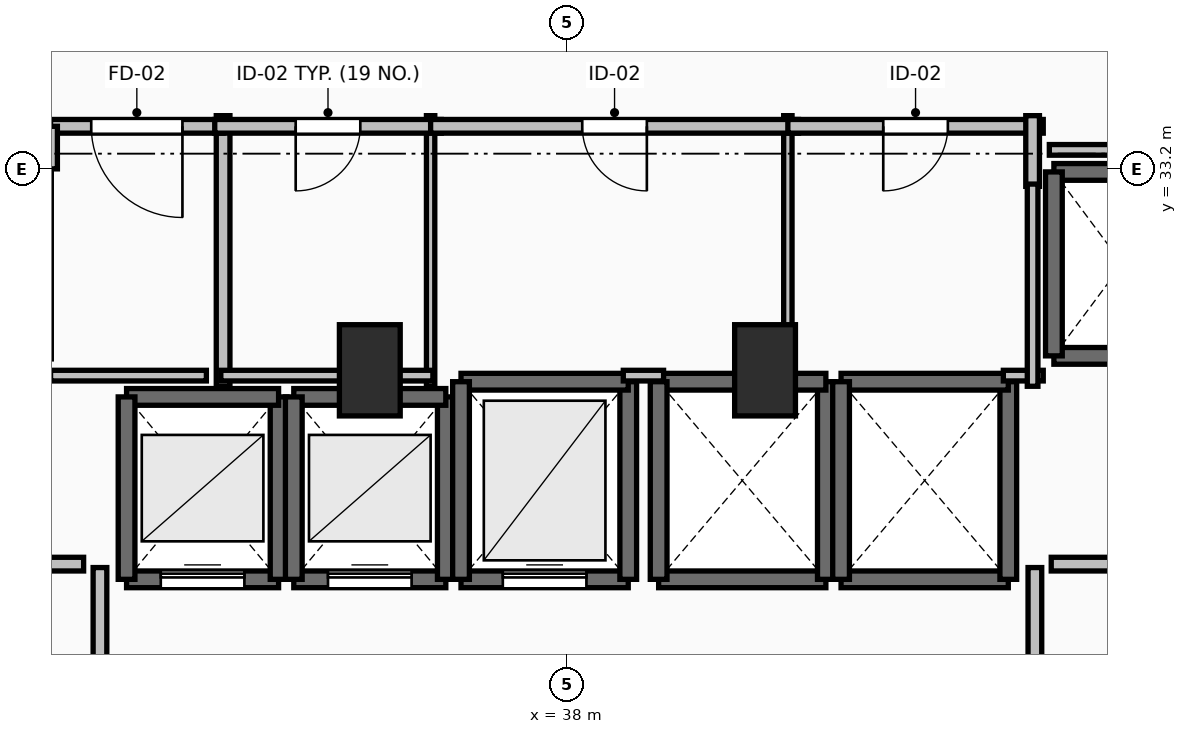
"""IFC4 building model, lengths in metres.
Left out: names, types, materials, properties, quantities, classifications, styles, units other than length and angle.
Written with IfcOpenShell. Run it as: python <this file> out.ifc"""

import sys

from ifc_helpers import new_model, si_unit, direction, frame, frame_2d, origin, origin_2d, place, context, subcontext, project, spatial, rectangle, extrude, element, fill, save


model = new_model("IFC4")
c1 = context("Model", 3, precision=1e-05, world=origin(), true_north=direction((0.0, 1.0)))
c2 = subcontext(c1, "Body", "Model", "MODEL_VIEW")
j1 = project(units=[si_unit("LENGTHUNIT", "METRE"), si_unit("PLANEANGLEUNIT", "RADIAN")], contexts=[c1])
p1 = place(None, origin())
s1 = spatial("IfcSite", under=j1, at=p1, CompositionType="ELEMENT")
p2 = place(p1, origin())
s2 = spatial("IfcBuilding", under=s1, at=p2, CompositionType="ELEMENT")
p3 = place(p2, frame((0.0, 0.0, 31.0)))
s3 = spatial("IfcBuildingStorey", under=s2, at=p3, CompositionType="ELEMENT", Elevation=31.0)
for number, where, z_axis, x_axis in (
    (1, (35.4, 30.55, 0.0), (0.0, 0.0, 1.0), (1.0, 0.0, 0.0)),
    (2, (40.6, 30.55, 0.0), (0.0, 0.0, 1.0), (1.0, 0.0, 0.0)),
):
    element("IfcColumn", number, at=place(p3, frame(where, z_axis=z_axis, x_axis=x_axis)), inside=s3, PredefinedType="PILASTER", context=c2, shape_type="SweptSolid", body=[
        extrude(rectangle(XDim=0.8, YDim=1.2, at=origin_2d()), origin(), (0.0, 0.0, 1.0), 3.5),
    ])
p4 = place(p3, frame((32.2, 27.8, 0.0), z_axis=(0.0, 0.0, 1.0), x_axis=(1.0, 0.0, 0.0)))
e3 = element("IfcWall", 3, at=p4, inside=s3, PredefinedType="SOLIDWALL", context=c2, shape_type="SweptSolid", body=[
    extrude(rectangle(XDim=2.0, YDim=0.22, at=frame_2d((1.0, 0.0))), origin(), (0.0, 0.0, 1.0), 3.24),
])
p5 = place(p4, frame((0.45, 0.0, 0.0)))
e4 = element("IfcOpeningElement", 4, at=p5, cuts=e3, PredefinedType="OPENING", context=c2, shape_type="SweptSolid", body=[
    extrude(rectangle(XDim=1.1, YDim=2.2, at=frame_2d((0.55, 1.1))), frame((0.0, 0.125, 0.0), z_axis=(0.0, -1.0, 0.0), x_axis=(1.0, 0.0, 0.0)), (0.0, 0.0, 1.0), 0.25),
])
p6 = place(p3, frame((34.2, 27.8, 0.0), z_axis=(0.0, 0.0, 1.0), x_axis=(0.0, 1.0, 0.0)))
e5 = element("IfcWall", 5, at=p6, inside=s3, PredefinedType="SOLIDWALL", context=c2, shape_type="SweptSolid", body=[
    extrude(rectangle(XDim=2.4, YDim=0.22, at=frame_2d((1.2, 0.0))), origin(), (0.0, 0.0, 1.0), 3.24),
])
p7 = place(p3, frame((34.2, 30.2, 0.0), z_axis=(0.0, 0.0, 1.0), x_axis=(-1.0, 0.0, 0.0)))
e6 = element("IfcWall", 6, at=p7, inside=s3, PredefinedType="SOLIDWALL", context=c2, shape_type="SweptSolid", body=[
    extrude(rectangle(XDim=2.0, YDim=0.22, at=frame_2d((1.0, 0.0))), origin(), (0.0, 0.0, 1.0), 3.24),
])
p8 = place(p3, frame((32.2, 30.2, 0.0), z_axis=(0.0, 0.0, 1.0), x_axis=(0.0, -1.0, 0.0)))
e7 = element("IfcWall", 7, at=p8, inside=s3, PredefinedType="SOLIDWALL", context=c2, shape_type="SweptSolid", body=[
    extrude(rectangle(XDim=2.4, YDim=0.22, at=frame_2d((1.2, 0.0))), origin(), (0.0, 0.0, 1.0), 3.24),
])
p9 = place(p3, frame((34.4, 27.8, 0.0), z_axis=(0.0, 0.0, 1.0), x_axis=(1.0, 0.0, 0.0)))
e8 = element("IfcWall", 8, at=p9, inside=s3, PredefinedType="SOLIDWALL", context=c2, shape_type="SweptSolid", body=[
    extrude(rectangle(XDim=2.0, YDim=0.22, at=frame_2d((1.0, 0.0))), origin(), (0.0, 0.0, 1.0), 3.24),
])
p10 = place(p9, frame((0.45, 0.0, 0.0)))
e9 = element("IfcOpeningElement", 9, at=p10, cuts=e8, PredefinedType="OPENING", context=c2, shape_type="SweptSolid", body=[
    extrude(rectangle(XDim=1.1, YDim=2.2, at=frame_2d((0.55, 1.1))), frame((0.0, 0.125, 0.0), z_axis=(0.0, -1.0, 0.0), x_axis=(1.0, 0.0, 0.0)), (0.0, 0.0, 1.0), 0.25),
])
p11 = place(p3, frame((36.4, 27.8, 0.0), z_axis=(0.0, 0.0, 1.0), x_axis=(0.0, 1.0, 0.0)))
e10 = element("IfcWall", 10, at=p11, inside=s3, PredefinedType="SOLIDWALL", context=c2, shape_type="SweptSolid", body=[
    extrude(rectangle(XDim=2.4, YDim=0.22, at=frame_2d((1.2, 0.0))), origin(), (0.0, 0.0, 1.0), 3.24),
])
p12 = place(p3, frame((36.4, 30.2, 0.0), z_axis=(0.0, 0.0, 1.0), x_axis=(-1.0, 0.0, 0.0)))
e11 = element("IfcWall", 11, at=p12, inside=s3, PredefinedType="SOLIDWALL", context=c2, shape_type="SweptSolid", body=[
    extrude(rectangle(XDim=2.0, YDim=0.22, at=frame_2d((1.0, 0.0))), origin(), (0.0, 0.0, 1.0), 3.24),
])
p13 = place(p3, frame((34.4, 30.2, 0.0), z_axis=(0.0, 0.0, 1.0), x_axis=(0.0, -1.0, 0.0)))
e12 = element("IfcWall", 12, at=p13, inside=s3, PredefinedType="SOLIDWALL", context=c2, shape_type="SweptSolid", body=[
    extrude(rectangle(XDim=2.4, YDim=0.22, at=frame_2d((1.2, 0.0))), origin(), (0.0, 0.0, 1.0), 3.24),
])
p14 = place(p3, frame((36.6, 27.8, 0.0), z_axis=(0.0, 0.0, 1.0), x_axis=(1.0, 0.0, 0.0)))
e13 = element("IfcWall", 13, at=p14, inside=s3, PredefinedType="SOLIDWALL", context=c2, shape_type="SweptSolid", body=[
    extrude(rectangle(XDim=2.2, YDim=0.22, at=frame_2d((1.1, 0.0))), origin(), (0.0, 0.0, 1.0), 3.24),
])
p15 = place(p14, frame((0.55, 0.0, 0.0)))
e14 = element("IfcOpeningElement", 14, at=p15, cuts=e13, PredefinedType="OPENING", context=c2, shape_type="SweptSolid", body=[
    extrude(rectangle(XDim=1.1, YDim=2.2, at=frame_2d((0.55, 1.1))), frame((0.0, 0.125, 0.0), z_axis=(0.0, -1.0, 0.0), x_axis=(1.0, 0.0, 0.0)), (0.0, 0.0, 1.0), 0.25),
])
p16 = place(p3, frame((38.8, 27.8, 0.0), z_axis=(0.0, 0.0, 1.0), x_axis=(0.0, 1.0, 0.0)))
e15 = element("IfcWall", 15, at=p16, inside=s3, PredefinedType="SOLIDWALL", context=c2, shape_type="SweptSolid", body=[
    extrude(rectangle(XDim=2.6, YDim=0.22, at=frame_2d((1.3, 0.0))), origin(), (0.0, 0.0, 1.0), 3.24),
])
p17 = place(p3, frame((38.8, 30.4, 0.0), z_axis=(0.0, 0.0, 1.0), x_axis=(-1.0, 0.0, 0.0)))
e16 = element("IfcWall", 16, at=p17, inside=s3, PredefinedType="SOLIDWALL", context=c2, shape_type="SweptSolid", body=[
    extrude(rectangle(XDim=2.2, YDim=0.22, at=frame_2d((1.1, 0.0))), origin(), (0.0, 0.0, 1.0), 3.24),
])
p18 = place(p3, frame((36.6, 30.4, 0.0), z_axis=(0.0, 0.0, 1.0), x_axis=(0.0, -1.0, 0.0)))
e17 = element("IfcWall", 17, at=p18, inside=s3, PredefinedType="SOLIDWALL", context=c2, shape_type="SweptSolid", body=[
    extrude(rectangle(XDim=2.6, YDim=0.22, at=frame_2d((1.3, 0.0))), origin(), (0.0, 0.0, 1.0), 3.24),
])
p19 = place(p3, frame((39.2, 27.8, 0.0), z_axis=(0.0, 0.0, 1.0), x_axis=(1.0, 0.0, 0.0)))
e18 = element("IfcWall", 18, at=p19, inside=s3, PredefinedType="SOLIDWALL", context=c2, shape_type="SweptSolid", body=[
    extrude(rectangle(XDim=2.2, YDim=0.22, at=frame_2d((1.1, 0.0))), origin(), (0.0, 0.0, 1.0), 3.24),
])
p20 = place(p3, frame((41.4, 27.8, 0.0), z_axis=(0.0, 0.0, 1.0), x_axis=(0.0, 1.0, 0.0)))
e19 = element("IfcWall", 19, at=p20, inside=s3, PredefinedType="SOLIDWALL", context=c2, shape_type="SweptSolid", body=[
    extrude(rectangle(XDim=2.6, YDim=0.22, at=frame_2d((1.3, 0.0))), origin(), (0.0, 0.0, 1.0), 3.24),
])
p21 = place(p3, frame((41.4, 30.4, 0.0), z_axis=(0.0, 0.0, 1.0), x_axis=(-1.0, 0.0, 0.0)))
e20 = element("IfcWall", 20, at=p21, inside=s3, PredefinedType="SOLIDWALL", context=c2, shape_type="SweptSolid", body=[
    extrude(rectangle(XDim=2.2, YDim=0.22, at=frame_2d((1.1, 0.0))), origin(), (0.0, 0.0, 1.0), 3.24),
])
p22 = place(p3, frame((39.2, 30.4, 0.0), z_axis=(0.0, 0.0, 1.0), x_axis=(0.0, -1.0, 0.0)))
e21 = element("IfcWall", 21, at=p22, inside=s3, PredefinedType="SOLIDWALL", context=c2, shape_type="SweptSolid", body=[
    extrude(rectangle(XDim=2.6, YDim=0.22, at=frame_2d((1.3, 0.0))), origin(), (0.0, 0.0, 1.0), 3.24),
])
p23 = place(p3, frame((41.6, 27.8, 0.0), z_axis=(0.0, 0.0, 1.0), x_axis=(1.0, 0.0, 0.0)))
e22 = element("IfcWall", 22, at=p23, inside=s3, PredefinedType="SOLIDWALL", context=c2, shape_type="SweptSolid", body=[
    extrude(rectangle(XDim=2.2, YDim=0.22, at=frame_2d((1.1, 0.0))), origin(), (0.0, 0.0, 1.0), 3.24),
])
p24 = place(p3, frame((43.8, 27.8, 0.0), z_axis=(0.0, 0.0, 1.0), x_axis=(0.0, 1.0, 0.0)))
e23 = element("IfcWall", 23, at=p24, inside=s3, PredefinedType="SOLIDWALL", context=c2, shape_type="SweptSolid", body=[
    extrude(rectangle(XDim=2.6, YDim=0.22, at=frame_2d((1.3, 0.0))), origin(), (0.0, 0.0, 1.0), 3.24),
])
p25 = place(p3, frame((43.8, 30.4, 0.0), z_axis=(0.0, 0.0, 1.0), x_axis=(-1.0, 0.0, 0.0)))
e24 = element("IfcWall", 24, at=p25, inside=s3, PredefinedType="SOLIDWALL", context=c2, shape_type="SweptSolid", body=[
    extrude(rectangle(XDim=2.2, YDim=0.22, at=frame_2d((1.1, 0.0))), origin(), (0.0, 0.0, 1.0), 3.24),
])
p26 = place(p3, frame((41.6, 30.4, 0.0), z_axis=(0.0, 0.0, 1.0), x_axis=(0.0, -1.0, 0.0)))
e25 = element("IfcWall", 25, at=p26, inside=s3, PredefinedType="SOLIDWALL", context=c2, shape_type="SweptSolid", body=[
    extrude(rectangle(XDim=2.6, YDim=0.22, at=frame_2d((1.3, 0.0))), origin(), (0.0, 0.0, 1.0), 3.24),
])
for number, where, z_axis, x_axis in (
    (26, (44.4, 30.74, 0.0), (0.0, 0.0, 1.0), (1.0, 0.0, 0.0)),
    (27, (46.2, 33.16, 0.0), (0.0, 0.0, 1.0), (-1.0, 0.0, 0.0)),
):
    element("IfcWall", number, at=place(p3, frame(where, z_axis=z_axis, x_axis=x_axis)), inside=s3, PredefinedType="SOLIDWALL", context=c2, shape_type="SweptSolid", body=[
        extrude(rectangle(XDim=1.8, YDim=0.22, at=frame_2d((0.9, 0.0))), origin(), (0.0, 0.0, 1.0), 3.24),
    ])
p27 = place(p3, frame((44.4, 33.16, 0.0), z_axis=(0.0, 0.0, 1.0), x_axis=(0.0, -1.0, 0.0)))
e28 = element("IfcWall", 28, at=p27, inside=s3, PredefinedType="SOLIDWALL", context=c2, shape_type="SweptSolid", body=[
    extrude(rectangle(XDim=2.42, YDim=0.22, at=frame_2d((1.21, 0.0))), origin(), (0.0, 0.0, 1.0), 3.24),
])
p28 = place(p3, frame((31.85, 24.045, 0.0), z_axis=(0.0, 0.0, 1.0), x_axis=(0.0, 1.0, 0.0)))
e29 = element("IfcWall", 29, at=p28, inside=s3, PredefinedType="PARTITIONING", context=c2, shape_type="SweptSolid", body=[
    extrude(rectangle(XDim=3.91, YDim=0.18, at=frame_2d((1.955, 0.0))), origin(), (0.0, 0.0, 1.0), 3.24),
])
p29 = place(p28, frame((1.355, 0.0, 0.0)))
e30 = element("IfcOpeningElement", 30, at=p29, cuts=e29, PredefinedType="OPENING", context=c2, shape_type="SweptSolid", body=[
    extrude(rectangle(XDim=1.2, YDim=2.15, at=frame_2d((0.6, 1.075))), frame((0.0, 0.105, 0.0), z_axis=(0.0, -1.0, 0.0), x_axis=(1.0, 0.0, 0.0)), (0.0, 0.0, 1.0), 0.21),
])
p30 = place(p3, frame((44.15, 27.955, 0.0), z_axis=(0.0, 0.0, 1.0), x_axis=(0.0, -1.0, 0.0)))
e31 = element("IfcWall", 31, at=p30, inside=s3, PredefinedType="PARTITIONING", context=c2, shape_type="SweptSolid", body=[
    extrude(rectangle(XDim=3.91, YDim=0.18, at=frame_2d((1.955, 0.0))), origin(), (0.0, 0.0, 1.0), 3.24),
])
p31 = place(p30, frame((1.355, 0.0, 0.0)))
e32 = element("IfcOpeningElement", 32, at=p31, cuts=e31, PredefinedType="OPENING", context=c2, shape_type="SweptSolid", body=[
    extrude(rectangle(XDim=1.2, YDim=2.15, at=frame_2d((0.6, 1.075))), frame((0.0, 0.105, 0.0), z_axis=(0.0, -1.0, 0.0), x_axis=(1.0, 0.0, 0.0)), (0.0, 0.0, 1.0), 0.21),
])
p32 = place(p3, frame((33.47, 30.34, 0.0), z_axis=(0.0, 0.0, 1.0), x_axis=(0.0, 1.0, 0.0)))
e33 = element("IfcWall", 33, at=p32, inside=s3, PredefinedType="PARTITIONING", context=c2, shape_type="SweptSolid", body=[
    extrude(rectangle(XDim=3.56, YDim=0.18, at=frame_2d((1.78, 0.0))), origin(), (0.0, 0.0, 1.0), 3.24),
])
p33 = place(p3, frame((33.47, 33.76, 0.0), z_axis=(0.0, 0.0, 1.0), x_axis=(-1.0, 0.0, 0.0)))
e34 = element("IfcWall", 34, at=p33, inside=s3, PredefinedType="PARTITIONING", context=c2, shape_type="SweptSolid", body=[
    extrude(rectangle(XDim=2.27, YDim=0.18, at=frame_2d((1.135, 0.0))), origin(), (0.0, 0.0, 1.0), 3.24),
])
p34 = place(p33, frame((0.535, 0.0, 0.0)))
e35 = element("IfcOpeningElement", 35, at=p34, cuts=e34, PredefinedType="OPENING", context=c2, shape_type="SweptSolid", body=[
    extrude(rectangle(XDim=1.2, YDim=2.15, at=frame_2d((0.6, 1.075))), frame((0.0, 0.105, 0.0), z_axis=(0.0, -1.0, 0.0), x_axis=(1.0, 0.0, 0.0)), (0.0, 0.0, 1.0), 0.21),
])
p35 = place(p3, frame((31.2, 33.76, 0.0), z_axis=(0.0, 0.0, 1.0), x_axis=(0.0, -1.0, 0.0)))
e36 = element("IfcWall", 36, at=p35, inside=s3, PredefinedType="PARTITIONING", context=c2, shape_type="SweptSolid", body=[
    extrude(rectangle(XDim=0.56, YDim=0.18, at=frame_2d((0.28, 0.0))), origin(), (0.0, 0.0, 1.0), 3.24),
])
p36 = place(p3, frame((36.2, 30.34, 0.0), z_axis=(0.0, 0.0, 1.0), x_axis=(0.0, 1.0, 0.0)))
e37 = element("IfcWall", 37, at=p36, inside=s3, PredefinedType="PARTITIONING", context=c2, shape_type="SweptSolid", body=[
    extrude(rectangle(XDim=3.56, YDim=0.11, at=frame_2d((1.78, 0.0))), origin(), (0.0, 0.0, 1.0), 2.432),
])
p37 = place(p3, frame((36.34, 33.76, 0.0), z_axis=(0.0, 0.0, 1.0), x_axis=(-1.0, 0.0, 0.0)))
e38 = element("IfcWall", 38, at=p37, inside=s3, PredefinedType="PARTITIONING", context=c2, shape_type="SweptSolid", body=[
    extrude(rectangle(XDim=2.98, YDim=0.18, at=frame_2d((1.49, 0.0))), origin(), (0.0, 0.0, 1.0), 3.24),
])
p38 = place(p37, frame((1.065, 0.0, 0.0)))
e39 = element("IfcOpeningElement", 39, at=p38, cuts=e38, PredefinedType="OPENING", context=c2, shape_type="SweptSolid", body=[
    extrude(rectangle(XDim=0.85, YDim=2.1, at=frame_2d((0.425, 1.05))), frame((0.0, 0.105, 0.0), z_axis=(0.0, -1.0, 0.0), x_axis=(1.0, 0.0, 0.0)), (0.0, 0.0, 1.0), 0.21),
])
p39 = place(p3, frame((40.9, 30.34, 0.0), z_axis=(0.0, 0.0, 1.0), x_axis=(0.0, 1.0, 0.0)))
e40 = element("IfcWall", 40, at=p39, inside=s3, PredefinedType="PARTITIONING", context=c2, shape_type="SweptSolid", body=[
    extrude(rectangle(XDim=3.56, YDim=0.11, at=frame_2d((1.78, 0.0))), origin(), (0.0, 0.0, 1.0), 3.24),
])
p40 = place(p3, frame((41.04, 33.76, 0.0), z_axis=(0.0, 0.0, 1.0), x_axis=(-1.0, 0.0, 0.0)))
e41 = element("IfcWall", 41, at=p40, inside=s3, PredefinedType="PARTITIONING", context=c2, shape_type="SweptSolid", body=[
    extrude(rectangle(XDim=4.84, YDim=0.18, at=frame_2d((2.42, 0.0))), origin(), (0.0, 0.0, 1.0), 3.24),
])
p41 = place(p40, frame((1.995, 0.0, 0.0)))
e42 = element("IfcOpeningElement", 42, at=p41, cuts=e41, PredefinedType="OPENING", context=c2, shape_type="SweptSolid", body=[
    extrude(rectangle(XDim=0.85, YDim=2.1, at=frame_2d((0.425, 1.05))), frame((0.0, 0.105, 0.0), z_axis=(0.0, -1.0, 0.0), x_axis=(1.0, 0.0, 0.0)), (0.0, 0.0, 1.0), 0.21),
])
p42 = place(p3, frame((44.26, 33.76, 0.0), z_axis=(0.0, 0.0, 1.0), x_axis=(-1.0, 0.0, 0.0)))
e43 = element("IfcWall", 43, at=p42, inside=s3, PredefinedType="PARTITIONING", context=c2, shape_type="SweptSolid", body=[
    extrude(rectangle(XDim=3.36, YDim=0.18, at=frame_2d((1.68, 0.0))), origin(), (0.0, 0.0, 1.0), 3.24),
])
p43 = place(p42, frame((1.255, 0.0, 0.0)))
e44 = element("IfcOpeningElement", 44, at=p43, cuts=e43, PredefinedType="OPENING", context=c2, shape_type="SweptSolid", body=[
    extrude(rectangle(XDim=0.85, YDim=2.1, at=frame_2d((0.425, 1.05))), frame((0.0, 0.105, 0.0), z_axis=(0.0, -1.0, 0.0), x_axis=(1.0, 0.0, 0.0)), (0.0, 0.0, 1.0), 0.21),
])
p44 = place(p3, frame((44.12, 32.97, 0.0), z_axis=(0.0, 0.0, 1.0), x_axis=(0.0, 1.0, 0.0)))
e45 = element("IfcWall", 45, at=p44, inside=s3, PredefinedType="PARTITIONING", context=c2, shape_type="SweptSolid", body=[
    extrude(rectangle(XDim=0.93, YDim=0.18, at=frame_2d((0.465, 0.0))), origin(), (0.0, 0.0, 1.0), 3.24),
])
for number, where, z_axis, x_axis in (
    (46, (31.635, 28.0, 0.0), (0.0, 0.0, 1.0), (-1.0, 0.0, 0.0)),
    (47, (45.28, 28.0, 0.0), (0.0, 0.0, 1.0), (-1.0, 0.0, 0.0)),
):
    element("IfcWall", number, at=place(p3, frame(where, z_axis=z_axis, x_axis=x_axis)), inside=s3, PredefinedType="PARTITIONING", context=c2, shape_type="SweptSolid", body=[
        extrude(rectangle(XDim=0.915, YDim=0.18, at=frame_2d((0.458, 0.0))), origin(), (0.0, 0.0, 1.0), 3.24),
    ])
p45 = place(p3, frame((31.2, 30.48, 0.0), z_axis=(0.0, 0.0, 1.0), x_axis=(1.0, 0.0, 0.0)))
e48 = element("IfcWall", 48, at=p45, inside=s3, PredefinedType="PARTITIONING", context=c2, shape_type="SweptSolid", body=[
    extrude(rectangle(XDim=2.05, YDim=0.14, at=frame_2d((1.025, 0.0))), origin(), (0.0, 0.0, 1.0), 3.24),
])
p46 = place(p3, frame((33.44, 30.48, 0.0), z_axis=(0.0, 0.0, 1.0), x_axis=(1.0, 0.0, 0.0)))
e49 = element("IfcWall", 49, at=p46, inside=s3, PredefinedType="PARTITIONING", context=c2, shape_type="SweptSolid", body=[
    extrude(rectangle(XDim=2.79, YDim=0.14, at=frame_2d((1.395, 0.0))), origin(), (0.0, 0.0, 1.0), 2.432),
])
p47 = place(p3, frame((38.735, 30.48, 0.0), z_axis=(0.0, 0.0, 1.0), x_axis=(1.0, 0.0, 0.0)))
e50 = element("IfcWall", 50, at=p47, inside=s3, PredefinedType="PARTITIONING", context=c2, shape_type="SweptSolid", body=[
    extrude(rectangle(XDim=0.53, YDim=0.14, at=frame_2d((0.265, 0.0))), origin(), (0.0, 0.0, 1.0), 2.432),
])
p48 = place(p3, frame((43.735, 30.48, 0.0), z_axis=(0.0, 0.0, 1.0), x_axis=(1.0, 0.0, 0.0)))
e51 = element("IfcWall", 51, at=p48, inside=s3, PredefinedType="PARTITIONING", context=c2, shape_type="SweptSolid", body=[
    extrude(rectangle(XDim=0.525, YDim=0.14, at=frame_2d((0.262, 0.0))), origin(), (0.0, 0.0, 1.0), 3.24),
])
p49 = place(p3, frame((44.12, 30.34, 0.0), z_axis=(0.0, 0.0, 1.0), x_axis=(0.0, 1.0, 0.0)))
e52 = element("IfcWall", 52, at=p49, inside=s3, PredefinedType="PARTITIONING", context=c2, shape_type="SweptSolid", body=[
    extrude(rectangle(XDim=2.66, YDim=0.14, at=frame_2d((1.33, 0.0))), origin(), (0.0, 0.0, 1.0), 3.24),
])
p50 = place(p3, frame((44.34, 33.45, 0.0), z_axis=(0.0, 0.0, 1.0), x_axis=(1.0, 0.0, 0.0)))
e53 = element("IfcWall", 53, at=p50, inside=s3, PredefinedType="PARTITIONING", context=c2, shape_type="SweptSolid", body=[
    extrude(rectangle(XDim=4.21, YDim=0.14, at=frame_2d((2.105, 0.0))), origin(), (0.0, 0.0, 1.0), 2.432),
])
p51 = place(p5, origin())
e54 = element("IfcDoor", 54, at=p51, inside=s3, OperationType="SLIDING_TO_LEFT", PredefinedType="DOOR", context=c2, shape_type="SweptSolid", body=[
    extrude(rectangle(XDim=1.1, YDim=2.2, at=frame_2d((0.55, 1.1))), frame((0.0, 0.025, 0.0), z_axis=(0.0, -1.0, 0.0), x_axis=(1.0, 0.0, 0.0)), (0.0, 0.0, 1.0), 0.05),
])
fill(e4, e54)
p52 = place(p10, origin())
e55 = element("IfcDoor", 55, at=p52, inside=s3, OperationType="SLIDING_TO_LEFT", PredefinedType="DOOR", context=c2, shape_type="SweptSolid", body=[
    extrude(rectangle(XDim=1.1, YDim=2.2, at=frame_2d((0.55, 1.1))), frame((0.0, 0.025, 0.0), z_axis=(0.0, -1.0, 0.0), x_axis=(1.0, 0.0, 0.0)), (0.0, 0.0, 1.0), 0.05),
])
fill(e9, e55)
p53 = place(p15, origin())
e56 = element("IfcDoor", 56, at=p53, inside=s3, OperationType="SLIDING_TO_LEFT", PredefinedType="DOOR", context=c2, shape_type="SweptSolid", body=[
    extrude(rectangle(XDim=1.1, YDim=2.2, at=frame_2d((0.55, 1.1))), frame((0.0, 0.025, 0.0), z_axis=(0.0, -1.0, 0.0), x_axis=(1.0, 0.0, 0.0)), (0.0, 0.0, 1.0), 0.05),
])
fill(e14, e56)
p54 = place(p34, origin())
e57 = element("IfcDoor", 57, at=p54, inside=s3, OperationType="SINGLE_SWING_LEFT", PredefinedType="DOOR", context=c2, shape_type="SweptSolid", body=[
    extrude(rectangle(XDim=1.2, YDim=2.15, at=frame_2d((0.6, 1.075))), frame((0.0, 0.025, 0.0), z_axis=(0.0, -1.0, 0.0), x_axis=(1.0, 0.0, 0.0)), (0.0, 0.0, 1.0), 0.05),
])
fill(e35, e57)
p55 = place(p38, origin())
e58 = element("IfcDoor", 58, at=p55, inside=s3, OperationType="SINGLE_SWING_RIGHT", PredefinedType="DOOR", context=c2, shape_type="SweptSolid", body=[
    extrude(rectangle(XDim=0.85, YDim=2.1, at=frame_2d((0.425, 1.05))), frame((0.0, 0.025, 0.0), z_axis=(0.0, -1.0, 0.0), x_axis=(1.0, 0.0, 0.0)), (0.0, 0.0, 1.0), 0.05),
])
fill(e39, e58)
p56 = place(p41, origin())
e59 = element("IfcDoor", 59, at=p56, inside=s3, OperationType="SINGLE_SWING_LEFT", PredefinedType="DOOR", context=c2, shape_type="SweptSolid", body=[
    extrude(rectangle(XDim=0.85, YDim=2.1, at=frame_2d((0.425, 1.05))), frame((0.0, 0.025, 0.0), z_axis=(0.0, -1.0, 0.0), x_axis=(1.0, 0.0, 0.0)), (0.0, 0.0, 1.0), 0.05),
])
fill(e42, e59)
p57 = place(p43, origin())
e60 = element("IfcDoor", 60, at=p57, inside=s3, OperationType="SINGLE_SWING_RIGHT", PredefinedType="DOOR", context=c2, shape_type="SweptSolid", body=[
    extrude(rectangle(XDim=0.85, YDim=2.1, at=frame_2d((0.425, 1.05))), frame((0.0, 0.025, 0.0), z_axis=(0.0, -1.0, 0.0), x_axis=(1.0, 0.0, 0.0)), (0.0, 0.0, 1.0), 0.05),
])
fill(e44, e60)
save(model, sys.argv[1])
